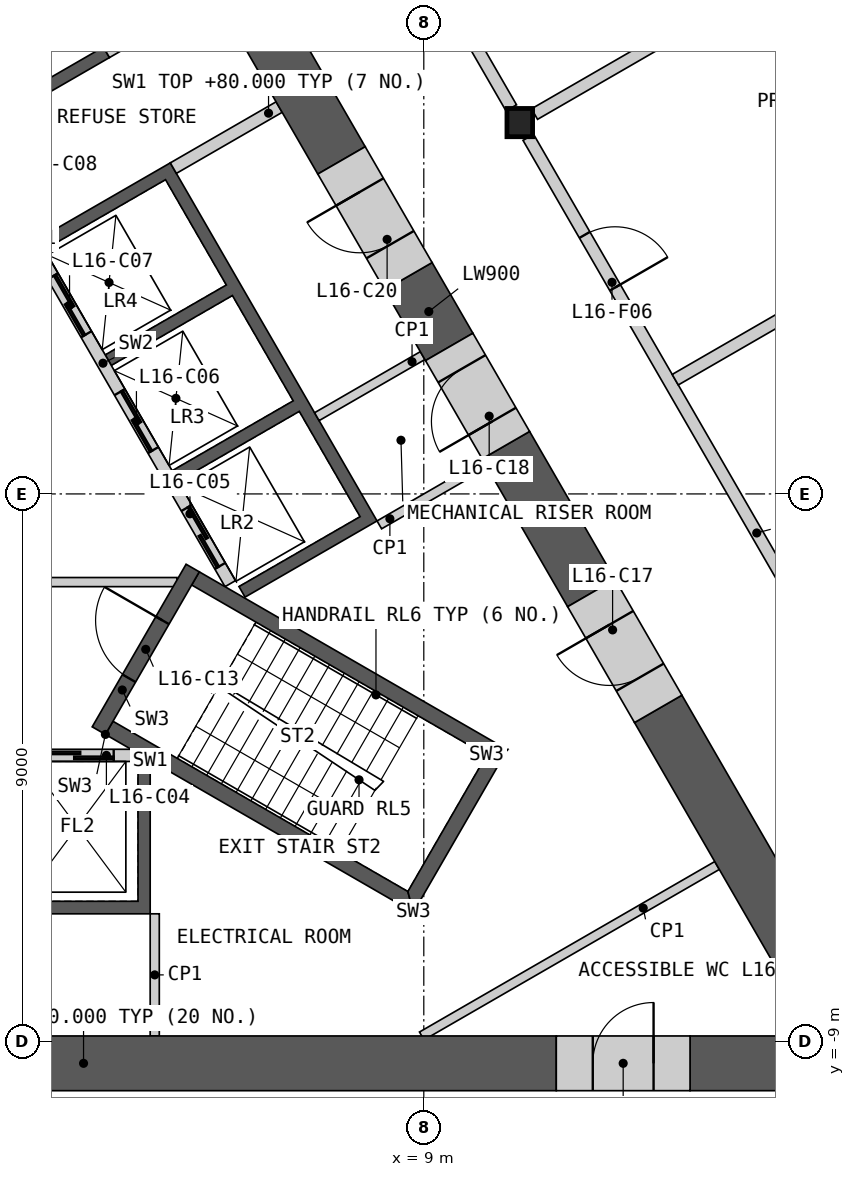
"""IFC4 building model, lengths in metres.
Left out: names, types, materials, properties, quantities, classifications, styles, units other than length and angle.
Written with IfcOpenShell. Run it as: python <this file> out.ifc"""

import sys

from ifc_helpers import new_model, si_unit, direction, frame, frame_2d, origin, origin_2d, place, context, subcontext, project, spatial, polyline, rectangle, i_section, outline, extrude, element, fill, save


model = new_model("IFC4")
c1 = context("Model", 3, precision=1e-05, world=origin(), true_north=direction((0.0, 1.0)))
c2 = subcontext(c1, "Body", "Model", "MODEL_VIEW")
j1 = project(units=[si_unit("LENGTHUNIT", "METRE"), si_unit("PLANEANGLEUNIT", "RADIAN")], contexts=[c1])
p1 = place(None, origin())
s1 = spatial("IfcSite", under=j1, at=p1, CompositionType="ELEMENT")
p2 = place(p1, origin())
s2 = spatial("IfcBuilding", under=s1, at=p2, CompositionType="ELEMENT")
p3 = place(p2, frame((0.0, 0.0, 76.2)))
s3 = spatial("IfcBuildingStorey", under=s2, at=p3, CompositionType="ELEMENT", Elevation=76.2)
p4 = place(p3, frame((10.578, 6.107, 0.0), z_axis=(0.0, 0.0, 1.0), x_axis=(1.0, 0.0, 0.0)))
e1 = element("IfcColumn", 1, at=p4, inside=s3, PredefinedType="COLUMN", context=c2, shape_type="SweptSolid", body=[
    extrude(i_section(OverallWidth=0.421, OverallDepth=0.465, WebThickness=0.045, FlangeThickness=0.072, at=origin_2d()), origin(), (0.0, 0.0, 1.0), 4.2),
])
p5 = place(p3, origin())
e2 = element("IfcWall", 2, at=p5, inside=s3, PredefinedType="SHEAR", context=c2, shape_type="SweptSolid", body=[
    extrude(outline(polyline([(4.5, -4.4), (4.5, -6.906), (-4.5, -6.906), (-4.5, -4.4), (-4.3, -4.4), (-4.3, -6.7), (-2.3, -6.7), (-2.3, -4.4), (-2.1, -4.4), (-2.1, -6.7), (-0.1, -6.7), (-0.1, -4.4), (0.1, -4.4), (0.1, -6.7), (2.1, -6.7), (2.1, -4.4), (2.3, -4.4), (2.3, -6.7), (4.3, -6.7), (4.3, -4.4), (4.5, -4.4)])), origin(), (0.0, 0.0, 1.0), 3.8),
])
p6 = place(p3, frame((-4.187, -4.3, 0.0), z_axis=(0.0, 0.0, 1.0), x_axis=(1.0, 0.0, 0.0)))
e3 = element("IfcWall", 3, at=p6, inside=s3, PredefinedType="SOLIDWALL", context=c2, shape_type="SweptSolid", body=[
    extrude(rectangle(XDim=8.373, YDim=0.2, at=frame_2d((4.187, 0.0))), origin(), (0.0, 0.0, 1.0), 3.8),
])
p7 = place(p6, frame((0.287, 0.0, 0.0)))
e4 = element("IfcOpeningElement", 4, at=p7, cuts=e3, PredefinedType="OPENING", context=c2, shape_type="SweptSolid", body=[
    extrude(rectangle(XDim=1.2, YDim=2.1, at=frame_2d((0.6, 1.05))), frame((0.0, 0.11, 0.0), z_axis=(0.0, -1.0, 0.0), x_axis=(1.0, 0.0, 0.0)), (0.0, 0.0, 1.0), 0.22),
])
p8 = place(p6, frame((2.387, 0.0, 0.0)))
e5 = element("IfcOpeningElement", 5, at=p8, cuts=e3, PredefinedType="OPENING", context=c2, shape_type="SweptSolid", body=[
    extrude(rectangle(XDim=1.4, YDim=2.1, at=frame_2d((0.7, 1.05))), frame((0.0, 0.11, 0.0), z_axis=(0.0, -1.0, 0.0), x_axis=(1.0, 0.0, 0.0)), (0.0, 0.0, 1.0), 0.22),
])
p9 = place(p6, frame((4.737, 0.0, 0.0)))
e6 = element("IfcOpeningElement", 6, at=p9, cuts=e3, PredefinedType="OPENING", context=c2, shape_type="SweptSolid", body=[
    extrude(rectangle(XDim=1.1, YDim=2.1, at=frame_2d((0.55, 1.05))), frame((0.0, 0.11, 0.0), z_axis=(0.0, -1.0, 0.0), x_axis=(1.0, 0.0, 0.0)), (0.0, 0.0, 1.0), 0.22),
])
p10 = place(p6, frame((6.887, 0.0, 0.0)))
e7 = element("IfcOpeningElement", 7, at=p10, cuts=e3, PredefinedType="OPENING", context=c2, shape_type="SweptSolid", body=[
    extrude(rectangle(XDim=1.2, YDim=2.1, at=frame_2d((0.6, 1.05))), frame((0.0, 0.11, 0.0), z_axis=(0.0, -1.0, 0.0), x_axis=(1.0, 0.0, 0.0)), (0.0, 0.0, 1.0), 0.22),
])
p11 = place(p3, origin())
e8 = element("IfcWall", 8, at=p11, inside=s3, PredefinedType="SHEAR", context=c2, shape_type="SweptSolid", body=[
    extrude(outline(polyline([(1.561, 6.097), (3.731, 7.35), (3.831, 7.177), (1.66, 5.924), (1.561, 6.097)])), origin(), (0.0, 0.0, 1.0), 3.8),
])
p12 = place(p3, origin())
e9 = element("IfcWall", 9, at=p12, inside=s3, PredefinedType="SHEAR", context=c2, shape_type="SweptSolid", body=[
    extrude(outline(polyline([(2.66, 4.192), (4.831, 5.445), (8.231, -0.444), (6.061, -1.697), (5.96, -1.524), (7.952, -0.374), (6.952, 1.358), (4.96, 0.208), (4.861, 0.381), (6.852, 1.531), (5.852, 3.263), (3.861, 2.113), (3.76, 2.287), (5.752, 3.437), (4.752, 5.169), (2.76, 4.019), (2.66, 4.192)])), origin(), (0.0, 0.0, 1.0), 3.8),
])
p13 = place(p3, frame((5.817, -1.476, 0.0), z_axis=(0.0, 0.0, 1.0), x_axis=(-0.500002616675, 0.866023893041, 0.0)))
e10 = element("IfcWall", 10, at=p13, inside=s3, PredefinedType="SOLIDWALL", context=c2, shape_type="SweptSolid", body=[
    extrude(rectangle(XDim=8.373, YDim=0.2, at=frame_2d((4.187, 0.0))), origin(), (0.0, 0.0, 1.0), 3.8),
])
p14 = place(p13, frame((0.337, 0.0, 0.0)))
e11 = element("IfcOpeningElement", 11, at=p14, cuts=e10, PredefinedType="OPENING", context=c2, shape_type="SweptSolid", body=[
    extrude(rectangle(XDim=1.1, YDim=2.1, at=frame_2d((0.55, 1.05))), frame((0.0, 0.11, 0.0), z_axis=(0.0, -1.0, 0.0), x_axis=(1.0, 0.0, 0.0)), (0.0, 0.0, 1.0), 0.22),
])
p15 = place(p13, frame((2.537, 0.0, 0.0)))
e12 = element("IfcOpeningElement", 12, at=p15, cuts=e10, PredefinedType="OPENING", context=c2, shape_type="SweptSolid", body=[
    extrude(rectangle(XDim=1.1, YDim=2.1, at=frame_2d((0.55, 1.05))), frame((0.0, 0.11, 0.0), z_axis=(0.0, -1.0, 0.0), x_axis=(1.0, 0.0, 0.0)), (0.0, 0.0, 1.0), 0.22),
])
p16 = place(p13, frame((4.737, 0.0, 0.0)))
e13 = element("IfcOpeningElement", 13, at=p16, cuts=e10, PredefinedType="OPENING", context=c2, shape_type="SweptSolid", body=[
    extrude(rectangle(XDim=1.1, YDim=2.1, at=frame_2d((0.55, 1.05))), frame((0.0, 0.11, 0.0), z_axis=(0.0, -1.0, 0.0), x_axis=(1.0, 0.0, 0.0)), (0.0, 0.0, 1.0), 0.22),
])
p17 = place(p13, frame((7.037, 0.0, 0.0)))
e14 = element("IfcOpeningElement", 14, at=p17, cuts=e10, PredefinedType="OPENING", context=c2, shape_type="SweptSolid", body=[
    extrude(rectangle(XDim=0.9, YDim=2.1, at=frame_2d((0.45, 1.05))), frame((0.0, 0.11, 0.0), z_axis=(0.0, -1.0, 0.0), x_axis=(1.0, 0.0, 0.0)), (0.0, 0.0, 1.0), 0.22),
])
p18 = place(p3, frame((4.881, 5.358, 0.0), z_axis=(0.0, 0.0, 1.0), x_axis=(0.866035824272, 0.499981950752, 0.0)))
e15 = element("IfcWall", 15, at=p18, inside=s3, PredefinedType="SHEAR", context=c2, shape_type="SweptSolid", body=[
    extrude(rectangle(XDim=2.009, YDim=0.2, at=frame_2d((1.004, 0.0))), origin(), (0.0, 0.0, 1.0), 3.8),
])
p19 = place(p3, frame((3.781, 7.263, 0.0), z_axis=(0.0, 0.0, 1.0), x_axis=(0.865983199114, 0.50007309351, 0.0)))
e16 = element("IfcWall", 16, at=p19, inside=s3, PredefinedType="SHEAR", context=c2, shape_type="SweptSolid", body=[
    extrude(rectangle(XDim=2.009, YDim=0.2, at=frame_2d((1.004, 0.0))), origin(), (0.0, 0.0, 1.0), 3.8),
])
p20 = place(p3, frame((-4.941, -1.45, 0.0), z_axis=(0.0, 0.0, 1.0), x_axis=(1.0, 0.0, 0.0)))
e17 = element("IfcWall", 17, at=p20, inside=s3, PredefinedType="PARTITIONING", context=c2, shape_type="SweptSolid", body=[
    extrude(rectangle(XDim=9.882, YDim=0.15, at=frame_2d((4.941, 0.0))), origin(), (0.0, 0.0, 1.0), 3.8),
])
p21 = place(p20, frame((4.391, 0.0, 0.0)))
e18 = element("IfcOpeningElement", 18, at=p21, cuts=e17, PredefinedType="OPENING", context=c2, shape_type="SweptSolid", body=[
    extrude(rectangle(XDim=1.1, YDim=2.1, at=frame_2d((0.55, 1.05))), frame((0.0, 0.085, 0.0), z_axis=(0.0, -1.0, 0.0), x_axis=(1.0, 0.0, 0.0)), (0.0, 0.0, 1.0), 0.17),
])
p22 = place(p3, origin())
e19 = element("IfcWall", 19, at=p22, inside=s3, PredefinedType="SHEAR", context=c2, shape_type="SweptSolid", body=[
    extrude(outline(polyline([(3.763, -3.956), (8.83, -6.881), (8.738, -6.539), (3.888, -3.739), (3.763, -3.956)])), origin(), (0.0, 0.0, 1.0), 3.8),
])
p23 = place(p3, origin())
e20 = element("IfcWall", 20, at=p23, inside=s3, PredefinedType="SHEAR", context=c2, shape_type="SweptSolid", body=[
    extrude(outline(polyline([(8.83, -6.881), (10.374, -4.206), (10.032, -4.298), (8.738, -6.539), (8.83, -6.881)])), origin(), (0.0, 0.0, 1.0), 3.8),
])
p24 = place(p3, origin())
e21 = element("IfcWall", 21, at=p24, inside=s3, PredefinedType="SHEAR", context=c2, shape_type="SweptSolid", body=[
    extrude(outline(polyline([(10.032, -4.298), (10.374, -4.206), (5.307, -1.281), (5.182, -1.498), (10.032, -4.298)])), origin(), (0.0, 0.0, 1.0), 3.8),
])
p25 = place(p3, frame((3.655, -3.893, 0.0), z_axis=(0.0, 0.0, 1.0), x_axis=(0.499982516597, 0.866035497597, 0.0)))
e22 = element("IfcWall", 22, at=p25, inside=s3, PredefinedType="SHEAR", context=c2, shape_type="SweptSolid", body=[
    extrude(rectangle(XDim=3.088, YDim=0.25, at=frame_2d((1.544, 0.0))), origin(), (0.0, 0.0, 1.0), 3.8),
])
p26 = place(p25, frame((0.994, 0.0, 0.0)))
e23 = element("IfcOpeningElement", 23, at=p26, cuts=e22, PredefinedType="OPENING", context=c2, shape_type="SweptSolid", body=[
    extrude(rectangle(XDim=1.1, YDim=2.1, at=frame_2d((0.55, 1.05))), frame((0.0, 0.135, 0.0), z_axis=(0.0, -1.0, 0.0), x_axis=(1.0, 0.0, 0.0)), (0.0, 0.0, 1.0), 0.27),
])
p27 = place(p3, frame((8.268, -0.509, 0.0), z_axis=(0.0, 0.0, 1.0), x_axis=(0.866035824272, 0.499981950752, 0.0)))
e24 = element("IfcWall", 24, at=p27, inside=s3, PredefinedType="PARTITIONING", context=c2, shape_type="SweptSolid", body=[
    extrude(rectangle(XDim=2.009, YDim=0.15, at=frame_2d((1.004, 0.0))), origin(), (0.0, 0.0, 1.0), 3.8),
])
p28 = place(p3, frame((4.575, -6.906, 0.0), z_axis=(0.0, 0.0, 1.0), x_axis=(0.0, -1.0, 0.0)))
e25 = element("IfcWall", 25, at=p28, inside=s3, PredefinedType="PARTITIONING", context=c2, shape_type="SweptSolid", body=[
    extrude(rectangle(XDim=2.009, YDim=0.15, at=frame_2d((1.004, 0.0))), origin(), (0.0, 0.0, 1.0), 3.8),
])
p29 = place(p3, frame((13.823, -6.111, 0.0), z_axis=(0.0, 0.0, 1.0), x_axis=(-0.866026802741, -0.499997576928, 0.0)))
e26 = element("IfcWall", 26, at=p29, inside=s3, PredefinedType="PARTITIONING", context=c2, shape_type="SweptSolid", body=[
    extrude(rectangle(XDim=5.607, YDim=0.15, at=frame_2d((2.804, 0.0))), origin(), (0.0, 0.0, 1.0), 3.8),
])
p30 = place(p3, frame((8.981, 2.275, 0.0), z_axis=(0.0, 0.0, 1.0), x_axis=(-0.866013584312, -0.500020471368, 0.0)))
e27 = element("IfcWall", 27, at=p30, inside=s3, PredefinedType="PARTITIONING", context=c2, shape_type="SweptSolid", body=[
    extrude(rectangle(XDim=2.009, YDim=0.15, at=frame_2d((1.005, 0.0))), origin(), (0.0, 0.0, 1.0), 3.8),
])
p31 = place(p3, frame((-4.371, -9.365, 0.0), z_axis=(0.0, 0.0, 1.0), x_axis=(1.0, 0.0, 0.0)))
e28 = element("IfcWall", 28, at=p31, inside=s3, PredefinedType="SHEAR", context=c2, shape_type="SweptSolid", body=[
    extrude(rectangle(XDim=15.55, YDim=0.9, at=frame_2d((7.775, 0.0))), origin(), (0.0, 0.0, 1.0), 3.8),
])
p32 = place(p3, frame((13.379, -9.365, 0.0), z_axis=(0.0, 0.0, 1.0), x_axis=(1.0, 0.0, 0.0)))
e29 = element("IfcWall", 29, at=p32, inside=s3, PredefinedType="SHEAR", context=c2, shape_type="SweptSolid", body=[
    extrude(rectangle(XDim=2.062, YDim=0.9, at=frame_2d((1.031, 0.0))), origin(), (0.0, 0.0, 1.0), 3.8),
])
p33 = place(p3, frame((7.646, 5.486, 0.0), z_axis=(0.0, 0.0, 1.0), x_axis=(-0.499982660725, 0.866035414388, 0.0)))
e30 = element("IfcWall", 30, at=p33, inside=s3, PredefinedType="SHEAR", context=c2, shape_type="SweptSolid", body=[
    extrude(rectangle(XDim=10.206, YDim=0.9, at=frame_2d((5.103, 0.0))), origin(), (0.0, 0.0, 1.0), 3.8),
])
p34 = place(p3, frame((15.831, -8.69, 0.0), z_axis=(0.0, 0.0, 1.0), x_axis=(-0.499999419053, 0.866025739194, 0.0)))
e31 = element("IfcWall", 31, at=p34, inside=s3, PredefinedType="SHEAR", context=c2, shape_type="SweptSolid", body=[
    extrude(rectangle(XDim=5.952, YDim=0.9, at=frame_2d((2.976, 0.0))), origin(), (0.0, 0.0, 1.0), 3.8),
])
p35 = place(p3, frame((11.755, -1.63, 0.0), z_axis=(0.0, 0.0, 1.0), x_axis=(-0.499943114462, 0.866058244174, 0.0)))
e32 = element("IfcWall", 32, at=p35, inside=s3, PredefinedType="SHEAR", context=c2, shape_type="SweptSolid", body=[
    extrude(rectangle(XDim=2.809, YDim=0.9, at=frame_2d((1.405, 0.0))), origin(), (0.0, 0.0, 1.0), 3.8),
])
p36 = place(p3, frame((9.418, 2.418, 0.0), z_axis=(0.0, 0.0, 1.0), x_axis=(-0.49995335277, 0.8660523339, 0.0)))
e33 = element("IfcWall", 33, at=p36, inside=s3, PredefinedType="SHEAR", context=c2, shape_type="SweptSolid", body=[
    extrude(rectangle(XDim=1.343, YDim=0.9, at=frame_2d((0.671, 0.0))), origin(), (0.0, 0.0, 1.0), 3.8),
])
p37 = place(p3, frame((11.179, -9.365, 0.0), z_axis=(0.0, 0.0, 1.0), x_axis=(1.0, 0.0, 0.0)))
e34 = element("IfcWall", 34, at=p37, inside=s3, PredefinedType="SHEAR", context=c2, shape_type="SweptSolid", body=[
    extrude(rectangle(XDim=2.2, YDim=0.9, at=frame_2d((1.1, 0.0))), origin(), (0.0, 0.0, 1.0), 3.8),
])
p38 = place(p37, frame((0.6, 0.0, 0.0)))
e35 = element("IfcOpeningElement", 35, at=p38, cuts=e34, PredefinedType="OPENING", context=c2, shape_type="SweptSolid", body=[
    extrude(rectangle(XDim=1.0, YDim=2.1, at=frame_2d((0.5, 1.05))), frame((0.0, 0.46, 0.0), z_axis=(0.0, -1.0, 0.0), x_axis=(1.0, 0.0, 0.0)), (0.0, 0.0, 1.0), 0.92),
])
p39 = place(p3, frame((12.855, -3.536, 0.0), z_axis=(0.0, 0.0, 1.0), x_axis=(-0.50002983664, 0.866008176907, 0.0)))
e36 = element("IfcWall", 36, at=p39, inside=s3, PredefinedType="SHEAR", context=c2, shape_type="SweptSolid", body=[
    extrude(rectangle(XDim=2.2, YDim=0.9, at=frame_2d((1.1, 0.0))), origin(), (0.0, 0.0, 1.0), 3.8),
])
p40 = place(p39, frame((0.6, 0.0, 0.0)))
e37 = element("IfcOpeningElement", 37, at=p40, cuts=e36, PredefinedType="OPENING", context=c2, shape_type="SweptSolid", body=[
    extrude(rectangle(XDim=1.0, YDim=2.1, at=frame_2d((0.5, 1.05))), frame((0.0, 0.46, 0.0), z_axis=(0.0, -1.0, 0.0), x_axis=(1.0, 0.0, 0.0)), (0.0, 0.0, 1.0), 0.92),
])
p41 = place(p3, frame((10.35, 0.803, 0.0), z_axis=(0.0, 0.0, 1.0), x_axis=(-0.500081290722, 0.865978465477, 0.0)))
e38 = element("IfcWall", 38, at=p41, inside=s3, PredefinedType="SHEAR", context=c2, shape_type="SweptSolid", body=[
    extrude(rectangle(XDim=1.865, YDim=0.9, at=frame_2d((0.933, 0.0))), origin(), (0.0, 0.0, 1.0), 3.8),
])
p42 = place(p41, frame((0.45, 0.0, 0.0)))
e39 = element("IfcOpeningElement", 39, at=p42, cuts=e38, PredefinedType="OPENING", context=c2, shape_type="SweptSolid", body=[
    extrude(rectangle(XDim=1.0, YDim=2.1, at=frame_2d((0.5, 1.05))), frame((0.0, 0.46, 0.0), z_axis=(0.0, -1.0, 0.0), x_axis=(1.0, 0.0, 0.0)), (0.0, 0.0, 1.0), 0.92),
])
p43 = place(p3, frame((8.747, 3.58, 0.0), z_axis=(0.0, 0.0, 1.0), x_axis=(-0.50002983664, 0.866008176907, 0.0)))
e40 = element("IfcWall", 40, at=p43, inside=s3, PredefinedType="SHEAR", context=c2, shape_type="SweptSolid", body=[
    extrude(rectangle(XDim=2.2, YDim=0.9, at=frame_2d((1.1, 0.0))), origin(), (0.0, 0.0, 1.0), 3.8),
])
p44 = place(p43, frame((0.6, 0.0, 0.0)))
e41 = element("IfcOpeningElement", 41, at=p44, cuts=e40, PredefinedType="OPENING", context=c2, shape_type="SweptSolid", body=[
    extrude(rectangle(XDim=1.0, YDim=2.1, at=frame_2d((0.5, 1.05))), frame((0.0, 0.46, 0.0), z_axis=(0.0, -1.0, 0.0), x_axis=(1.0, 0.0, 0.0)), (0.0, 0.0, 1.0), 0.92),
])
p45 = place(p3, frame((5.429, 15.026, 0.0), z_axis=(0.0, 0.0, 1.0), x_axis=(0.50001002959, -0.86601961312, 0.0)))
e42 = element("IfcWall", 42, at=p45, inside=s3, PredefinedType="PARTITIONING", context=c2, shape_type="SweptSolid", body=[
    extrude(rectangle(XDim=10.019, YDim=0.2, at=frame_2d((5.009, 0.0))), origin(), (0.0, 0.0, 1.0), 3.8),
])
p46 = place(p45, frame((4.76, 0.0, 0.0)))
e43 = element("IfcOpeningElement", 43, at=p46, cuts=e42, PredefinedType="OPENING", context=c2, shape_type="SweptSolid", body=[
    extrude(rectangle(XDim=1.0, YDim=2.1, at=frame_2d((0.5, 1.05))), frame((0.0, 0.11, 0.0), z_axis=(0.0, -1.0, 0.0), x_axis=(1.0, 0.0, 0.0)), (0.0, 0.0, 1.0), 0.22),
])
p47 = place(p3, frame((10.719, 5.865, 0.0), z_axis=(0.0, 0.0, 1.0), x_axis=(0.49999175339, -0.866030164915, 0.0)))
e44 = element("IfcWall", 44, at=p47, inside=s3, PredefinedType="PARTITIONING", context=c2, shape_type="SweptSolid", body=[
    extrude(rectangle(XDim=10.019, YDim=0.2, at=frame_2d((5.009, 0.0))), origin(), (0.0, 0.0, 1.0), 3.8),
])
p48 = place(p47, frame((1.854, 0.0, 0.0)))
e45 = element("IfcOpeningElement", 45, at=p48, cuts=e44, PredefinedType="OPENING", context=c2, shape_type="SweptSolid", body=[
    extrude(rectangle(XDim=1.0, YDim=2.1, at=frame_2d((0.5, 1.05))), frame((0.0, 0.11, 0.0), z_axis=(0.0, -1.0, 0.0), x_axis=(1.0, 0.0, 0.0)), (0.0, 0.0, 1.0), 0.22),
])
p49 = place(p3, frame((10.821, 6.247, 0.0), z_axis=(0.0, 0.0, 1.0), x_axis=(0.866026729935, 0.499997703033, 0.0)))
e46 = element("IfcWall", 46, at=p49, inside=s3, PredefinedType="PARTITIONING", context=c2, shape_type="SweptSolid", body=[
    extrude(rectangle(XDim=12.848, YDim=0.2, at=frame_2d((6.424, 0.0))), origin(), (0.0, 0.0, 1.0), 2.885),
])
p50 = place(p3, frame((13.135, 1.879, 0.0), z_axis=(0.0, 0.0, 1.0), x_axis=(0.866027626846, 0.499996149525, 0.0)))
e47 = element("IfcWall", 47, at=p50, inside=s3, PredefinedType="PARTITIONING", context=c2, shape_type="SweptSolid", body=[
    extrude(rectangle(XDim=8.571, YDim=0.2, at=frame_2d((4.285, 0.0))), origin(), (0.0, 0.0, 1.0), 2.885),
])
p51 = place(p10, origin())
e48 = element("IfcDoor", 48, at=p51, inside=s3, OperationType="SLIDING_TO_LEFT", PredefinedType="DOOR", context=c2, shape_type="SweptSolid", body=[
    extrude(rectangle(XDim=1.2, YDim=2.1, at=frame_2d((0.6, 1.05))), frame((0.0, 0.025, 0.0), z_axis=(0.0, -1.0, 0.0), x_axis=(1.0, 0.0, 0.0)), (0.0, 0.0, 1.0), 0.05),
])
fill(e7, e48)
p52 = place(p14, origin())
e49 = element("IfcDoor", 49, at=p52, inside=s3, OperationType="SLIDING_TO_LEFT", PredefinedType="DOOR", context=c2, shape_type="SweptSolid", body=[
    extrude(rectangle(XDim=1.1, YDim=2.1, at=frame_2d((0.55, 1.05))), frame((0.0, 0.025, 0.0), z_axis=(0.0, -1.0, 0.0), x_axis=(1.0, 0.0, 0.0)), (0.0, 0.0, 1.0), 0.05),
])
fill(e11, e49)
p53 = place(p15, origin())
e50 = element("IfcDoor", 50, at=p53, inside=s3, OperationType="SLIDING_TO_LEFT", PredefinedType="DOOR", context=c2, shape_type="SweptSolid", body=[
    extrude(rectangle(XDim=1.1, YDim=2.1, at=frame_2d((0.55, 1.05))), frame((0.0, 0.025, 0.0), z_axis=(0.0, -1.0, 0.0), x_axis=(1.0, 0.0, 0.0)), (0.0, 0.0, 1.0), 0.05),
])
fill(e12, e50)
p54 = place(p16, origin())
e51 = element("IfcDoor", 51, at=p54, inside=s3, OperationType="SLIDING_TO_LEFT", PredefinedType="DOOR", context=c2, shape_type="SweptSolid", body=[
    extrude(rectangle(XDim=1.1, YDim=2.1, at=frame_2d((0.55, 1.05))), frame((0.0, 0.025, 0.0), z_axis=(0.0, -1.0, 0.0), x_axis=(1.0, 0.0, 0.0)), (0.0, 0.0, 1.0), 0.05),
])
fill(e13, e51)
p55 = place(p26, origin())
e52 = element("IfcDoor", 52, at=p55, inside=s3, OperationType="SINGLE_SWING_RIGHT", PredefinedType="DOOR", context=c2, shape_type="SweptSolid", body=[
    extrude(rectangle(XDim=1.1, YDim=2.1, at=frame_2d((0.55, 1.05))), frame((0.0, 0.025, 0.0), z_axis=(0.0, -1.0, 0.0), x_axis=(1.0, 0.0, 0.0)), (0.0, 0.0, 1.0), 0.05),
])
fill(e23, e52)
p56 = place(p38, origin())
e53 = element("IfcDoor", 53, at=p56, inside=s3, OperationType="SINGLE_SWING_RIGHT", PredefinedType="DOOR", context=c2, shape_type="SweptSolid", body=[
    extrude(rectangle(XDim=1.0, YDim=2.1, at=frame_2d((0.5, 1.05))), frame((0.0, 0.205, 0.0), z_axis=(0.0, -1.0, 0.0), x_axis=(1.0, 0.0, 0.0)), (0.0, 0.0, 1.0), 0.05),
])
fill(e35, e53)
p57 = place(p40, origin())
e54 = element("IfcDoor", 54, at=p57, inside=s3, OperationType="SINGLE_SWING_RIGHT", PredefinedType="DOOR", context=c2, shape_type="SweptSolid", body=[
    extrude(rectangle(XDim=1.0, YDim=2.1, at=frame_2d((0.5, 1.05))), frame((0.0, 0.205, 0.0), z_axis=(0.0, -1.0, 0.0), x_axis=(1.0, 0.0, 0.0)), (0.0, 0.0, 1.0), 0.05),
])
fill(e37, e54)
p58 = place(p42, origin())
e55 = element("IfcDoor", 55, at=p58, inside=s3, OperationType="SINGLE_SWING_LEFT", PredefinedType="DOOR", context=c2, shape_type="SweptSolid", body=[
    extrude(rectangle(XDim=1.0, YDim=2.1, at=frame_2d((0.5, 1.05))), frame((0.0, 0.205, 0.0), z_axis=(0.0, -1.0, 0.0), x_axis=(1.0, 0.0, 0.0)), (0.0, 0.0, 1.0), 0.05),
])
fill(e39, e55)
p59 = place(p44, origin())
e56 = element("IfcDoor", 56, at=p59, inside=s3, OperationType="SINGLE_SWING_RIGHT", PredefinedType="DOOR", context=c2, shape_type="SweptSolid", body=[
    extrude(rectangle(XDim=1.0, YDim=2.1, at=frame_2d((0.5, 1.05))), frame((0.0, 0.205, 0.0), z_axis=(0.0, -1.0, 0.0), x_axis=(1.0, 0.0, 0.0)), (0.0, 0.0, 1.0), 0.05),
])
fill(e41, e56)
p60 = place(p48, origin())
e57 = element("IfcDoor", 57, at=p60, inside=s3, OperationType="SINGLE_SWING_RIGHT", PredefinedType="DOOR", context=c2, shape_type="SweptSolid", body=[
    extrude(rectangle(XDim=1.0, YDim=2.1, at=frame_2d((0.5, 1.05))), frame((0.0, 0.025, 0.0), z_axis=(0.0, -1.0, 0.0), x_axis=(1.0, 0.0, 0.0)), (0.0, 0.0, 1.0), 0.05),
])
fill(e45, e57)
save(model, sys.argv[1])
